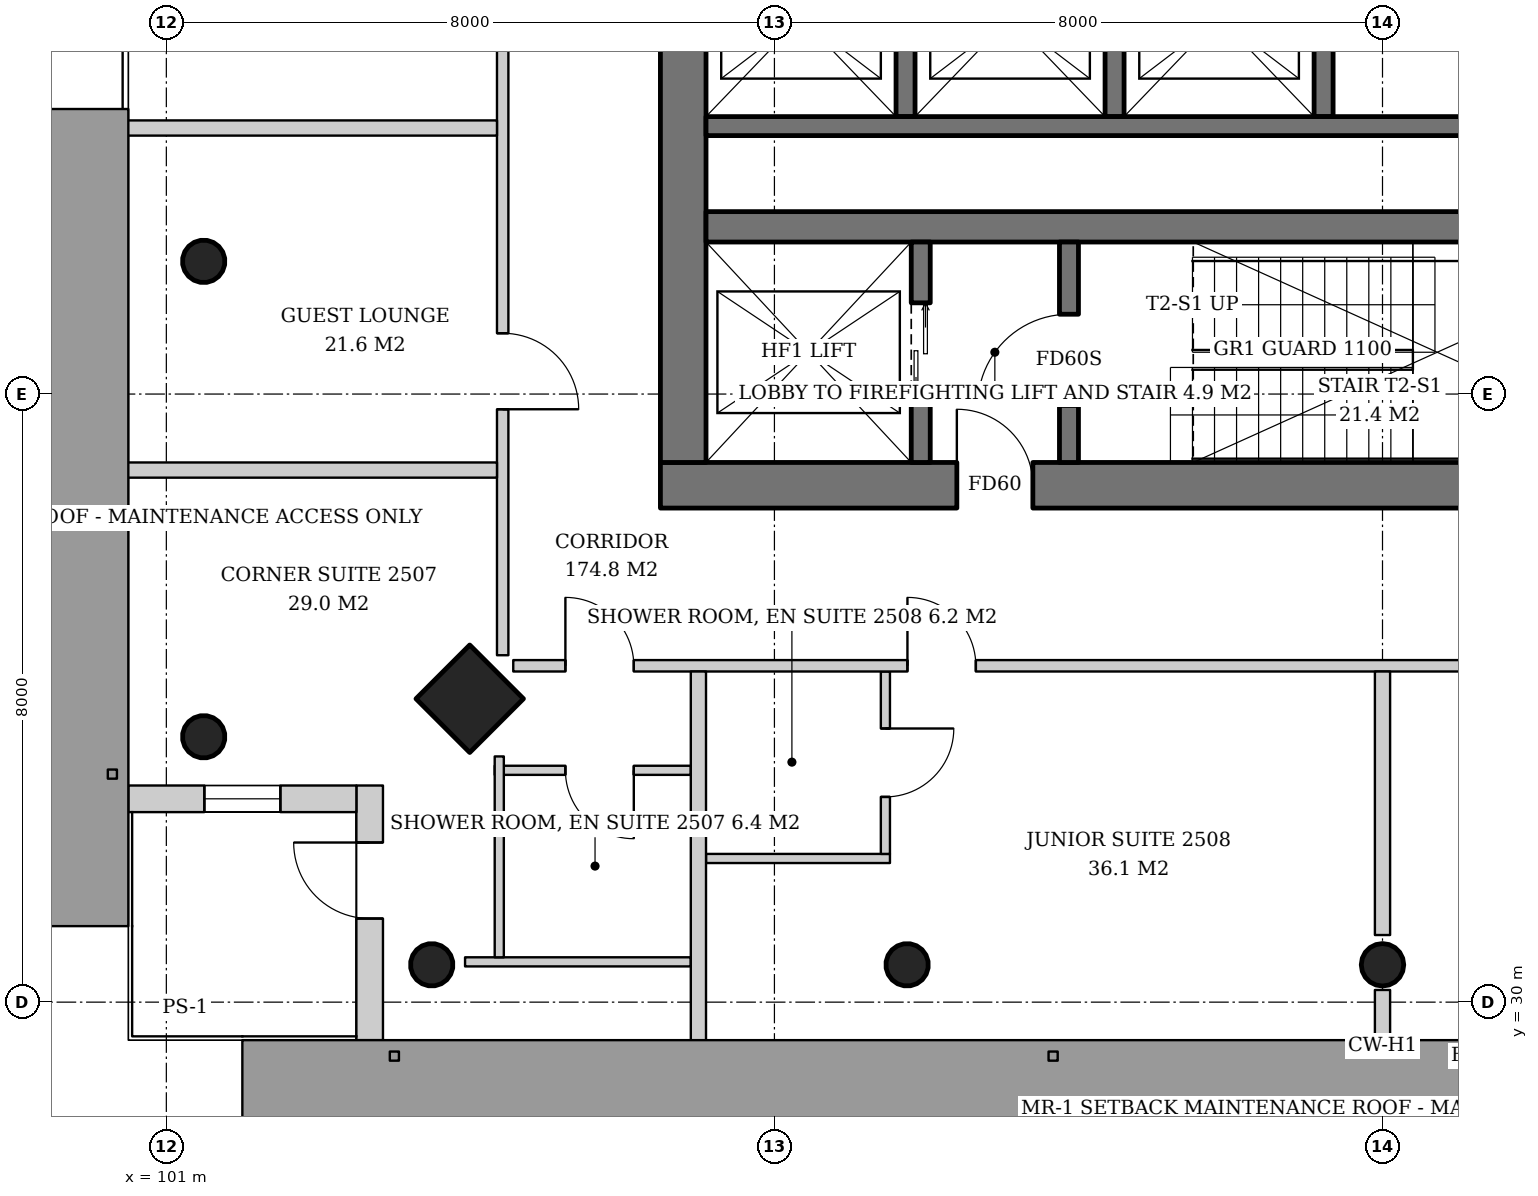
"""IFC4 building model, lengths in metres.
Left out: names, types, materials, properties, quantities, classifications, styles, units other than length and angle.
Written with IfcOpenShell. Run it as: python <this file> out.ifc"""

import sys

from ifc_helpers import new_model, si_unit, direction, frame, frame_2d, origin, origin_2d, place, context, subcontext, project, spatial, rectangle, hollow_circle, extrude, element, fill, save


model = new_model("IFC4")
c1 = context("Model", 3, precision=1e-05, world=origin(), true_north=direction((0.0, 1.0)))
c2 = subcontext(c1, "Body", "Model", "MODEL_VIEW")
j1 = project(units=[si_unit("LENGTHUNIT", "METRE"), si_unit("PLANEANGLEUNIT", "RADIAN")], contexts=[c1])
p1 = place(None, origin())
s1 = spatial("IfcSite", under=j1, at=p1, CompositionType="ELEMENT")
p2 = place(p1, origin())
s2 = spatial("IfcBuilding", under=s1, at=p2, CompositionType="ELEMENT")
p3 = place(p2, frame((0.0, 0.0, 100.8)))
s3 = spatial("IfcBuildingStorey", under=s2, at=p3, CompositionType="ELEMENT", Elevation=100.8)
p4 = place(p3, frame((104.94, 33.94, 0.0), z_axis=(0.043029647111, 0.043029647111, 0.998146732169), x_axis=(-0.707106781187, 0.707106781187, 0.0)))
e1 = element("IfcColumn", 1, at=p4, inside=s3, PredefinedType="COLUMN", context=c2, shape_type="SweptSolid", body=[
    extrude(rectangle(XDim=1.0, YDim=1.0, at=origin_2d()), origin(), (0.0, 0.0, 1.0), 3.807),
])
p5 = place(p3, frame((101.44, 33.44, 0.0), z_axis=(0.043029647111, 0.043029647111, 0.998146732169), x_axis=(-0.707106781187, 0.707106781187, 0.0)))
e2 = element("IfcColumn", 2, at=p5, inside=s3, PredefinedType="COLUMN", context=c2, shape_type="SweptSolid", body=[
    extrude(hollow_circle(Radius=0.28, WallThickness=0.02, at=origin_2d()), origin(), (0.0, 0.0, 1.0), 3.807),
])
p6 = place(p3, frame((101.44, 39.72, 0.0), z_axis=(0.043059525333, 0.021561848751, 0.998839808957), x_axis=(-0.44774654769, 0.894160516368, 0.0)))
e3 = element("IfcColumn", 3, at=p6, inside=s3, PredefinedType="COLUMN", context=c2, shape_type="SweptSolid", body=[
    extrude(hollow_circle(Radius=0.28, WallThickness=0.02, at=origin_2d()), origin(), (0.0, 0.0, 1.0), 3.804),
])
p7 = place(p3, frame((104.44, 30.44, 0.0), z_axis=(0.043029647111, 0.043029647111, 0.998146732169), x_axis=(-0.707106781187, 0.707106781187, 0.0)))
e4 = element("IfcColumn", 4, at=p7, inside=s3, PredefinedType="COLUMN", context=c2, shape_type="SweptSolid", body=[
    extrude(hollow_circle(Radius=0.28, WallThickness=0.02, at=origin_2d()), origin(), (0.0, 0.0, 1.0), 3.807),
])
p8 = place(p3, frame((110.72, 30.44, 0.0), z_axis=(0.021561848751, 0.043059525333, 0.998839808957), x_axis=(-0.894160516368, 0.44774654769, 0.0)))
e5 = element("IfcColumn", 5, at=p8, inside=s3, PredefinedType="COLUMN", context=c2, shape_type="SweptSolid", body=[
    extrude(hollow_circle(Radius=0.28, WallThickness=0.02, at=origin_2d()), origin(), (0.0, 0.0, 1.0), 3.804),
])
p9 = place(p3, frame((117.0, 30.44, 0.0), z_axis=(0.0, 0.043069538298, 0.999072076915), x_axis=(-1.0, 0.0, 0.0)))
e6 = element("IfcColumn", 6, at=p9, inside=s3, PredefinedType="COLUMN", context=c2, shape_type="SweptSolid", body=[
    extrude(hollow_circle(Radius=0.28, WallThickness=0.02, at=origin_2d()), origin(), (0.0, 0.0, 1.0), 3.803),
])
p10 = place(p3, frame((107.5, 36.8, 0.0), z_axis=(0.0, 0.0, 1.0), x_axis=(1.0, 0.0, 0.0)))
e7 = element("IfcWall", 7, at=p10, inside=s3, PredefinedType="SHEAR", context=c2, shape_type="SweptSolid", body=[
    extrude(rectangle(XDim=19.0, YDim=0.6, at=frame_2d((9.5, 0.0))), origin(), (0.0, 0.0, 1.0), 3.8),
])
p11 = place(p10, frame((3.9, 0.0, 0.0)))
e8 = element("IfcOpeningElement", 8, at=p11, cuts=e7, PredefinedType="OPENING", context=c2, shape_type="SweptSolid", body=[
    extrude(rectangle(XDim=1.0, YDim=2.1, at=frame_2d((0.5, 1.05))), frame((0.0, 0.31, 0.0), z_axis=(0.0, -1.0, 0.0), x_axis=(1.0, 0.0, 0.0)), (0.0, 0.0, 1.0), 0.62),
])
p12 = place(p10, frame((14.08, 0.0, 0.0)))
e9 = element("IfcOpeningElement", 9, at=p12, cuts=e7, PredefinedType="OPENING", context=c2, shape_type="SweptSolid", body=[
    extrude(rectangle(XDim=1.0, YDim=2.1, at=frame_2d((0.5, 1.05))), frame((0.0, 0.31, 0.0), z_axis=(0.0, -1.0, 0.0), x_axis=(1.0, 0.0, 0.0)), (0.0, 0.0, 1.0), 0.62),
])
p13 = place(p10, frame((15.615, 0.0, 0.0)))
e10 = element("IfcOpeningElement", 10, at=p13, cuts=e7, PredefinedType="OPENING", context=c2, shape_type="SweptSolid", body=[
    extrude(rectangle(XDim=1.0, YDim=2.1, at=frame_2d((0.5, 1.05))), frame((0.0, 0.31, 0.0), z_axis=(0.0, -1.0, 0.0), x_axis=(1.0, 0.0, 0.0)), (0.0, 0.0, 1.0), 0.62),
])
p14 = place(p10, frame((17.188, 0.0, 0.0)))
e11 = element("IfcOpeningElement", 11, at=p14, cuts=e7, PredefinedType="OPENING", context=c2, shape_type="SweptSolid", body=[
    extrude(rectangle(XDim=1.0, YDim=2.1, at=frame_2d((0.5, 1.05))), frame((0.0, 0.31, 0.0), z_axis=(0.0, -1.0, 0.0), x_axis=(1.0, 0.0, 0.0)), (0.0, 0.0, 1.0), 0.62),
])
p15 = place(p3, frame((107.8, 37.1, 0.0), z_axis=(0.0, 0.0, 1.0), x_axis=(0.0, 1.0, 0.0)))
e12 = element("IfcWall", 12, at=p15, inside=s3, PredefinedType="SHEAR", context=c2, shape_type="SweptSolid", body=[
    extrude(rectangle(XDim=17.8, YDim=0.6, at=frame_2d((8.9, 0.0))), origin(), (0.0, 0.0, 1.0), 3.8),
])
p16 = place(p15, frame((8.0, 0.0, 0.0)))
e13 = element("IfcOpeningElement", 13, at=p16, cuts=e12, PredefinedType="OPENING", context=c2, shape_type="SweptSolid", body=[
    extrude(rectangle(XDim=1.8, YDim=2.4, at=frame_2d((0.9, 1.2))), frame((0.0, 0.31, 0.0), z_axis=(0.0, -1.0, 0.0), x_axis=(1.0, 0.0, 0.0)), (0.0, 0.0, 1.0), 0.62),
])
p17 = place(p3, frame((108.1, 40.2, 0.0), z_axis=(0.0, 0.0, 1.0), x_axis=(1.0, 0.0, 0.0)))
e14 = element("IfcWall", 14, at=p17, inside=s3, PredefinedType="SHEAR", context=c2, shape_type="SweptSolid", body=[
    extrude(rectangle(XDim=17.8, YDim=0.4, at=frame_2d((8.9, 0.0))), origin(), (0.0, 0.0, 1.0), 3.8),
])
p18 = place(p3, frame((103.675, 29.5, 0.0), z_axis=(0.0, 0.0, 1.0), x_axis=(0.0, 1.0, 0.0)))
e15 = element("IfcWall", 15, at=p18, inside=s3, PredefinedType="SOLIDWALL", context=c2, shape_type="SweptSolid", body=[
    extrude(rectangle(XDim=3.35, YDim=0.35, at=frame_2d((1.675, 0.0))), origin(), (0.0, 0.0, 1.0), 3.6),
])
p19 = place(p18, frame((1.6, 0.0, 0.0)))
e16 = element("IfcOpeningElement", 16, at=p19, cuts=e15, PredefinedType="OPENING", context=c2, shape_type="SweptSolid", body=[
    extrude(rectangle(XDim=1.0, YDim=2.4, at=frame_2d((0.5, 1.2))), frame((0.0, 0.185, 0.0), z_axis=(0.0, -1.0, 0.0), x_axis=(1.0, 0.0, 0.0)), (0.0, 0.0, 1.0), 0.37),
])
p20 = place(p3, frame((103.5, 32.675, 0.0), z_axis=(0.0, 0.0, 1.0), x_axis=(-1.0, 0.0, 0.0)))
e17 = element("IfcWall", 17, at=p20, inside=s3, PredefinedType="SOLIDWALL", context=c2, shape_type="SweptSolid", body=[
    extrude(rectangle(XDim=3.0, YDim=0.35, at=frame_2d((1.5, 0.0))), origin(), (0.0, 0.0, 1.0), 3.6),
])
p21 = place(p20, frame((1.0, 0.0, 0.9)))
e18 = element("IfcOpeningElement", 18, at=p21, cuts=e17, PredefinedType="OPENING", context=c2, shape_type="SweptSolid", body=[
    extrude(rectangle(XDim=1.0, YDim=2.4, at=frame_2d((0.5, 1.2))), frame((0.0, 0.185, 0.0), z_axis=(0.0, -1.0, 0.0), x_axis=(1.0, 0.0, 0.0)), (0.0, 0.0, 1.0), 0.37),
])
p22 = place(p3, frame((110.925, 37.1, 0.0), z_axis=(0.0, 0.0, 1.0), x_axis=(0.0, 1.0, 0.0)))
e19 = element("IfcWall", 19, at=p22, inside=s3, PredefinedType="SHEAR", context=c2, shape_type="SweptSolid", body=[
    extrude(rectangle(XDim=2.9, YDim=0.25, at=frame_2d((1.45, 0.0))), origin(), (0.0, 0.0, 1.0), 3.8),
])
p23 = place(p22, frame((0.8, 0.0, 0.0)))
e20 = element("IfcOpeningElement", 20, at=p23, cuts=e19, PredefinedType="OPENING", context=c2, shape_type="SweptSolid", body=[
    extrude(rectangle(XDim=1.3, YDim=2.2, at=frame_2d((0.65, 1.1))), frame((0.0, 0.135, 0.0), z_axis=(0.0, -1.0, 0.0), x_axis=(1.0, 0.0, 0.0)), (0.0, 0.0, 1.0), 0.27),
])
p24 = place(p3, frame((112.875, 37.1, 0.0), z_axis=(0.0, 0.0, 1.0), x_axis=(0.0, 1.0, 0.0)))
e21 = element("IfcWall", 21, at=p24, inside=s3, PredefinedType="SHEAR", context=c2, shape_type="SweptSolid", body=[
    extrude(rectangle(XDim=2.9, YDim=0.25, at=frame_2d((1.45, 0.0))), origin(), (0.0, 0.0, 1.0), 3.8),
])
p25 = place(p24, frame((0.75, 0.0, 0.0)))
e22 = element("IfcOpeningElement", 22, at=p25, cuts=e21, PredefinedType="OPENING", context=c2, shape_type="SweptSolid", body=[
    extrude(rectangle(XDim=1.2, YDim=2.1, at=frame_2d((0.6, 1.05))), frame((0.0, 0.135, 0.0), z_axis=(0.0, -1.0, 0.0), x_axis=(1.0, 0.0, 0.0)), (0.0, 0.0, 1.0), 0.27),
])
for number, where, z_axis, x_axis in (
    (23, (110.725, 44.25, 0.0), (0.0, 0.0, 1.0), (0.0, -1.0, 0.0)),
    (24, (113.475, 44.25, 0.0), (0.0, 0.0, 1.0), (0.0, -1.0, 0.0)),
    (25, (116.225, 44.25, 0.0), (0.0, 0.0, 1.0), (0.0, -1.0, 0.0)),
):
    element("IfcWall", number, at=place(p3, frame(where, z_axis=z_axis, x_axis=x_axis)), inside=s3, PredefinedType="SHEAR", context=c2, shape_type="SweptSolid", body=[
        extrude(rectangle(XDim=2.6, YDim=0.25, at=frame_2d((1.3, 0.0))), origin(), (0.0, 0.0, 1.0), 3.8),
    ])
p26 = place(p3, frame((108.1, 41.525, 0.0), z_axis=(0.0, 0.0, 1.0), x_axis=(1.0, 0.0, 0.0)))
e26 = element("IfcWall", 26, at=p26, inside=s3, PredefinedType="SHEAR", context=c2, shape_type="SweptSolid", body=[
    extrude(rectangle(XDim=11.0, YDim=0.25, at=frame_2d((5.5, 0.0))), origin(), (0.0, 0.0, 1.0), 3.8),
])
p27 = place(p3, frame((105.425, 57.436, 0.0), z_axis=(0.0, 0.0, 1.0), x_axis=(0.0, -1.0, 0.0)))
e27 = element("IfcWall", 27, at=p27, inside=s3, PredefinedType="PARTITIONING", context=c2, shape_type="SweptSolid", body=[
    extrude(rectangle(XDim=22.872, YDim=0.15, at=frame_2d((11.436, 0.0))), origin(), (0.0, 0.0, 1.0), 2.9),
])
p28 = place(p27, frame((0.686, 0.0, 0.0)))
e28 = element("IfcOpeningElement", 28, at=p28, cuts=e27, PredefinedType="OPENING", context=c2, shape_type="SweptSolid", body=[
    extrude(rectangle(XDim=0.9, YDim=2.1, at=frame_2d((0.45, 1.05))), frame((0.0, 0.085, 0.0), z_axis=(0.0, -1.0, 0.0), x_axis=(1.0, 0.0, 0.0)), (0.0, 0.0, 1.0), 0.17),
])
p29 = place(p27, frame((5.136, 0.0, 0.0)))
e29 = element("IfcOpeningElement", 29, at=p29, cuts=e27, PredefinedType="OPENING", context=c2, shape_type="SweptSolid", body=[
    extrude(rectangle(XDim=1.0, YDim=2.1, at=frame_2d((0.5, 1.05))), frame((0.0, 0.085, 0.0), z_axis=(0.0, -1.0, 0.0), x_axis=(1.0, 0.0, 0.0)), (0.0, 0.0, 1.0), 0.17),
])
p30 = place(p27, frame((9.686, 0.0, 0.0)))
e30 = element("IfcOpeningElement", 30, at=p30, cuts=e27, PredefinedType="OPENING", context=c2, shape_type="SweptSolid", body=[
    extrude(rectangle(XDim=0.9, YDim=2.1, at=frame_2d((0.45, 1.05))), frame((0.0, 0.085, 0.0), z_axis=(0.0, -1.0, 0.0), x_axis=(1.0, 0.0, 0.0)), (0.0, 0.0, 1.0), 0.17),
])
p31 = place(p27, frame((18.636, 0.0, 0.0)))
e31 = element("IfcOpeningElement", 31, at=p31, cuts=e27, PredefinedType="OPENING", context=c2, shape_type="SweptSolid", body=[
    extrude(rectangle(XDim=1.0, YDim=2.1, at=frame_2d((0.5, 1.05))), frame((0.0, 0.085, 0.0), z_axis=(0.0, -1.0, 0.0), x_axis=(1.0, 0.0, 0.0)), (0.0, 0.0, 1.0), 0.17),
])
for number, where, z_axis, x_axis in (
    (32, (105.35, 41.5, 0.0), (0.0, 0.0, 1.0), (-1.0, 0.0, 0.0)),
    (33, (105.35, 37.0, 0.0), (0.0, 0.0, 1.0), (-1.0, 0.0, 0.0)),
):
    element("IfcWall", number, at=place(p3, frame(where, z_axis=z_axis, x_axis=x_axis)), inside=s3, PredefinedType="PARTITIONING", context=c2, shape_type="SweptSolid", body=[
        extrude(rectangle(XDim=4.89, YDim=0.2, at=frame_2d((2.445, 0.0))), origin(), (0.0, 0.0, 1.0), 3.2),
    ])
p32 = place(p3, frame((107.9, 33.05, 0.0), z_axis=(0.0, 0.0, 1.0), x_axis=(-1.0, 0.0, 0.0)))
e34 = element("IfcWall", 34, at=p32, inside=s3, PredefinedType="PARTITIONING", context=c2, shape_type="SweptSolid", body=[
    extrude(rectangle(XDim=2.58, YDim=0.12, at=frame_2d((1.29, 0.0))), origin(), (0.0, 0.0, 1.0), 2.9),
])
p33 = place(p32, frame((0.75, 0.0, 0.0)))
e35 = element("IfcOpeningElement", 35, at=p33, cuts=e34, PredefinedType="OPENING", context=c2, shape_type="SweptSolid", body=[
    extrude(rectangle(XDim=0.9, YDim=2.1, at=frame_2d((0.45, 1.05))), frame((0.0, 0.07, 0.0), z_axis=(0.0, -1.0, 0.0), x_axis=(1.0, 0.0, 0.0)), (0.0, 0.0, 1.0), 0.14),
])
p34 = place(p3, frame((107.9, 30.53, 0.0), z_axis=(0.0, 0.0, 1.0), x_axis=(-1.0, 0.0, 0.0)))
e36 = element("IfcWall", 36, at=p34, inside=s3, PredefinedType="PARTITIONING", context=c2, shape_type="SweptSolid", body=[
    extrude(rectangle(XDim=2.97, YDim=0.12, at=frame_2d((1.485, 0.0))), origin(), (0.0, 0.0, 1.0), 3.2),
])
p35 = place(p3, frame((105.38, 33.233, 0.0), z_axis=(0.0, 0.0, 1.0), x_axis=(0.0, -1.0, 0.0)))
e37 = element("IfcWall", 37, at=p35, inside=s3, PredefinedType="PARTITIONING", context=c2, shape_type="SweptSolid", body=[
    extrude(rectangle(XDim=2.643, YDim=0.12, at=frame_2d((1.321, 0.0))), origin(), (0.0, 0.0, 1.0), 3.2),
])
p36 = place(p3, frame((108.1, 31.89, 0.0), z_axis=(0.0, 0.0, 1.0), x_axis=(1.0, 0.0, 0.0)))
e38 = element("IfcWall", 38, at=p36, inside=s3, PredefinedType="PARTITIONING", context=c2, shape_type="SweptSolid", body=[
    extrude(rectangle(XDim=2.42, YDim=0.12, at=frame_2d((1.21, 0.0))), origin(), (0.0, 0.0, 1.0), 3.6),
])
p37 = place(p3, frame((110.46, 34.35, 0.0), z_axis=(0.0, 0.0, 1.0), x_axis=(0.0, -1.0, 0.0)))
e39 = element("IfcWall", 39, at=p37, inside=s3, PredefinedType="PARTITIONING", context=c2, shape_type="SweptSolid", body=[
    extrude(rectangle(XDim=2.4, YDim=0.12, at=frame_2d((1.2, 0.0))), origin(), (0.0, 0.0, 1.0), 3.6),
])
p38 = place(p37, frame((0.75, 0.0, 0.0)))
e40 = element("IfcOpeningElement", 40, at=p38, cuts=e39, PredefinedType="OPENING", context=c2, shape_type="SweptSolid", body=[
    extrude(rectangle(XDim=0.9, YDim=2.1, at=frame_2d((0.45, 1.05))), frame((0.0, 0.07, 0.0), z_axis=(0.0, -1.0, 0.0), x_axis=(1.0, 0.0, 0.0)), (0.0, 0.0, 1.0), 0.14),
])
p39 = place(p3, frame((105.564, 34.425, 0.0), z_axis=(0.0, 0.0, 1.0), x_axis=(1.0, 0.0, 0.0)))
e41 = element("IfcWall", 41, at=p39, inside=s3, PredefinedType="PARTITIONING", context=c2, shape_type="SweptSolid", body=[
    extrude(rectangle(XDim=22.872, YDim=0.15, at=frame_2d((11.436, 0.0))), origin(), (0.0, 0.0, 1.0), 2.9),
])
p40 = place(p39, frame((0.686, 0.0, 0.0)))
e42 = element("IfcOpeningElement", 42, at=p40, cuts=e41, PredefinedType="OPENING", context=c2, shape_type="SweptSolid", body=[
    extrude(rectangle(XDim=0.9, YDim=2.1, at=frame_2d((0.45, 1.05))), frame((0.0, 0.085, 0.0), z_axis=(0.0, -1.0, 0.0), x_axis=(1.0, 0.0, 0.0)), (0.0, 0.0, 1.0), 0.17),
])
p41 = place(p39, frame((5.186, 0.0, 0.0)))
e43 = element("IfcOpeningElement", 43, at=p41, cuts=e41, PredefinedType="OPENING", context=c2, shape_type="SweptSolid", body=[
    extrude(rectangle(XDim=0.9, YDim=2.1, at=frame_2d((0.45, 1.05))), frame((0.0, 0.085, 0.0), z_axis=(0.0, -1.0, 0.0), x_axis=(1.0, 0.0, 0.0)), (0.0, 0.0, 1.0), 0.17),
])
p42 = place(p39, frame((14.136, 0.0, 0.0)))
e44 = element("IfcOpeningElement", 44, at=p42, cuts=e41, PredefinedType="OPENING", context=c2, shape_type="SweptSolid", body=[
    extrude(rectangle(XDim=1.0, YDim=2.1, at=frame_2d((0.5, 1.05))), frame((0.0, 0.085, 0.0), z_axis=(0.0, -1.0, 0.0), x_axis=(1.0, 0.0, 0.0)), (0.0, 0.0, 1.0), 0.17),
])
p43 = place(p3, frame((108.0, 34.35, 0.0), z_axis=(0.0, 0.0, 1.0), x_axis=(0.0, -1.0, 0.0)))
e45 = element("IfcWall", 45, at=p43, inside=s3, PredefinedType="PARTITIONING", context=c2, shape_type="SweptSolid", body=[
    extrude(rectangle(XDim=4.89, YDim=0.2, at=frame_2d((2.445, 0.0))), origin(), (0.0, 0.0, 1.0), 2.9),
])
p44 = place(p3, frame((117.0, 34.35, 0.0), z_axis=(0.0, 0.0, 1.0), x_axis=(0.0, -1.0, 0.0)))
e46 = element("IfcWall", 46, at=p44, inside=s3, PredefinedType="PARTITIONING", context=c2, shape_type="SweptSolid", body=[
    extrude(rectangle(XDim=3.467, YDim=0.2, at=frame_2d((1.733, 0.0))), origin(), (0.0, 0.0, 1.0), 3.6),
])
p45 = place(p3, frame((117.0, 30.16, 0.0), z_axis=(0.0, 0.0, 1.0), x_axis=(0.0, -1.0, 0.0)))
e47 = element("IfcWall", 47, at=p45, inside=s3, PredefinedType="PARTITIONING", context=c2, shape_type="SweptSolid", body=[
    extrude(rectangle(XDim=0.7, YDim=0.2, at=frame_2d((0.35, 0.0))), origin(), (0.0, 0.0, 1.0), 3.6),
])
p46 = place(p19, origin())
e48 = element("IfcDoor", 48, at=p46, inside=s3, OperationType="SINGLE_SWING_RIGHT", PredefinedType="DOOR", context=c2, shape_type="SweptSolid", body=[
    extrude(rectangle(XDim=1.0, YDim=2.4, at=frame_2d((0.5, 1.2))), frame((0.0, 0.025, 0.0), z_axis=(0.0, -1.0, 0.0), x_axis=(1.0, 0.0, 0.0)), (0.0, 0.0, 1.0), 0.05),
])
fill(e16, e48)
p47 = place(p21, origin())
e49 = element("IfcWindow", 49, at=p47, inside=s3, PartitioningType="SINGLE_PANEL", PredefinedType="WINDOW", context=c2, shape_type="SweptSolid", body=[
    extrude(rectangle(XDim=1.0, YDim=2.4, at=frame_2d((0.5, 1.2))), frame((0.0, 0.03, 0.0), z_axis=(0.0, -1.0, 0.0), x_axis=(1.0, 0.0, 0.0)), (0.0, 0.0, 1.0), 0.06),
])
fill(e18, e49)
p48 = place(p23, origin())
e50 = element("IfcDoor", 50, at=p48, inside=s3, OperationType="DOUBLE_DOOR_SLIDING", PredefinedType="DOOR", context=c2, shape_type="SweptSolid", body=[
    extrude(rectangle(XDim=1.3, YDim=2.2, at=frame_2d((0.65, 1.1))), frame((0.0, 0.025, 0.0), z_axis=(0.0, -1.0, 0.0), x_axis=(1.0, 0.0, 0.0)), (0.0, 0.0, 1.0), 0.05),
])
fill(e20, e50)
p49 = place(p25, origin())
e51 = element("IfcDoor", 51, at=p49, inside=s3, OperationType="SINGLE_SWING_LEFT", PredefinedType="DOOR", context=c2, shape_type="SweptSolid", body=[
    extrude(rectangle(XDim=1.2, YDim=2.1, at=frame_2d((0.6, 1.05))), frame((0.0, 0.025, 0.0), z_axis=(0.0, -1.0, 0.0), x_axis=(1.0, 0.0, 0.0)), (0.0, 0.0, 1.0), 0.05),
])
fill(e22, e51)
p50 = place(p11, origin())
e52 = element("IfcDoor", 52, at=p50, inside=s3, OperationType="SINGLE_SWING_LEFT", PredefinedType="DOOR", context=c2, shape_type="SweptSolid", body=[
    extrude(rectangle(XDim=1.0, YDim=2.1, at=frame_2d((0.5, 1.05))), frame((0.0, 0.025, 0.0), z_axis=(0.0, -1.0, 0.0), x_axis=(1.0, 0.0, 0.0)), (0.0, 0.0, 1.0), 0.05),
])
fill(e8, e52)
p51 = place(p31, origin())
e53 = element("IfcDoor", 53, at=p51, inside=s3, OperationType="SINGLE_SWING_RIGHT", PredefinedType="DOOR", context=c2, shape_type="SweptSolid", body=[
    extrude(rectangle(XDim=1.0, YDim=2.1, at=frame_2d((0.5, 1.05))), frame((0.0, 0.025, 0.0), z_axis=(0.0, -1.0, 0.0), x_axis=(1.0, 0.0, 0.0)), (0.0, 0.0, 1.0), 0.05),
])
fill(e31, e53)
p52 = place(p33, origin())
e54 = element("IfcDoor", 54, at=p52, inside=s3, OperationType="SINGLE_SWING_LEFT", PredefinedType="DOOR", context=c2, shape_type="SweptSolid", body=[
    extrude(rectangle(XDim=0.9, YDim=2.1, at=frame_2d((0.45, 1.05))), frame((0.0, 0.025, 0.0), z_axis=(0.0, -1.0, 0.0), x_axis=(1.0, 0.0, 0.0)), (0.0, 0.0, 1.0), 0.05),
])
fill(e35, e54)
p53 = place(p38, origin())
e55 = element("IfcDoor", 55, at=p53, inside=s3, OperationType="SINGLE_SWING_LEFT", PredefinedType="DOOR", context=c2, shape_type="SweptSolid", body=[
    extrude(rectangle(XDim=0.9, YDim=2.1, at=frame_2d((0.45, 1.05))), frame((0.0, 0.025, 0.0), z_axis=(0.0, -1.0, 0.0), x_axis=(1.0, 0.0, 0.0)), (0.0, 0.0, 1.0), 0.05),
])
fill(e40, e55)
p54 = place(p40, origin())
e56 = element("IfcDoor", 56, at=p54, inside=s3, OperationType="SINGLE_SWING_LEFT", PredefinedType="DOOR", context=c2, shape_type="SweptSolid", body=[
    extrude(rectangle(XDim=0.9, YDim=2.1, at=frame_2d((0.45, 1.05))), frame((0.0, 0.025, 0.0), z_axis=(0.0, -1.0, 0.0), x_axis=(1.0, 0.0, 0.0)), (0.0, 0.0, 1.0), 0.05),
])
fill(e42, e56)
p55 = place(p41, origin())
e57 = element("IfcDoor", 57, at=p55, inside=s3, OperationType="SINGLE_SWING_LEFT", PredefinedType="DOOR", context=c2, shape_type="SweptSolid", body=[
    extrude(rectangle(XDim=0.9, YDim=2.1, at=frame_2d((0.45, 1.05))), frame((0.0, 0.025, 0.0), z_axis=(0.0, -1.0, 0.0), x_axis=(1.0, 0.0, 0.0)), (0.0, 0.0, 1.0), 0.05),
])
fill(e43, e57)
save(model, sys.argv[1])
